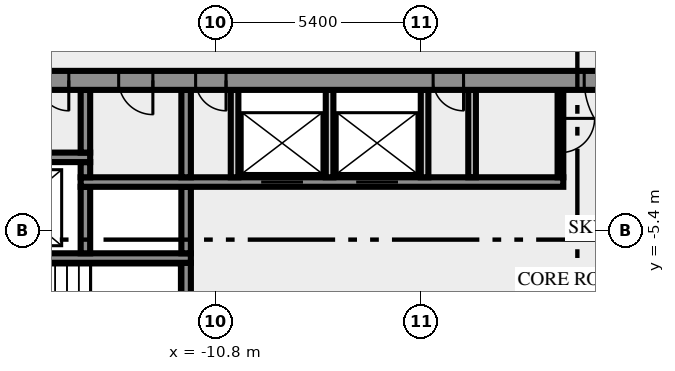
"""IFC4 building model, lengths in metres.
Left out: names, types, materials, properties, quantities, classifications, styles, units other than length and angle.
Written with IfcOpenShell. Run it as: python <this file> out.ifc"""

import sys

from ifc_helpers import new_model, si_unit, direction, frame, frame_2d, origin, place, context, subcontext, project, spatial, rectangle, extrude, element, fill, save


model = new_model("IFC4")
c1 = context("Model", 3, precision=1e-05, world=origin(), true_north=direction((0.0, 1.0)))
c2 = subcontext(c1, "Body", "Model", "MODEL_VIEW")
j1 = project(units=[si_unit("LENGTHUNIT", "METRE"), si_unit("PLANEANGLEUNIT", "RADIAN")], contexts=[c1])
p1 = place(None, origin())
s1 = spatial("IfcSite", under=j1, at=p1, CompositionType="ELEMENT")
p2 = place(p1, origin())
s2 = spatial("IfcBuilding", under=s1, at=p2, CompositionType="ELEMENT")
p3 = place(p2, frame((0.0, 0.0, 248.0)))
s3 = spatial("IfcBuildingStorey", under=s2, at=p3, CompositionType="ELEMENT", Elevation=248.0)
p4 = place(p3, frame((-11.575, -7.25, 0.0), z_axis=(0.0, 0.0, 1.0), x_axis=(0.0, 1.0, 0.0)))
e1 = element("IfcWall", 1, at=p4, inside=s3, PredefinedType="SHEAR", context=c2, shape_type="SweptSolid", body=[
    extrude(rectangle(XDim=1.0, YDim=0.25, at=frame_2d((0.5, 0.0))), origin(), (0.0, 0.0, 1.0), 4.65),
])
p5 = place(p3, frame((-11.45, -6.125, 0.0), z_axis=(0.0, 0.0, 1.0), x_axis=(-1.0, 0.0, 0.0)))
e2 = element("IfcWall", 2, at=p5, inside=s3, PredefinedType="SHEAR", context=c2, shape_type="SweptSolid", body=[
    extrude(rectangle(XDim=8.05, YDim=0.25, at=frame_2d((4.025, 0.0))), origin(), (0.0, 0.0, 1.0), 4.65),
])
p6 = place(p5, frame((6.2, 0.0, 0.0)))
e3 = element("IfcOpeningElement", 3, at=p6, cuts=e2, PredefinedType="OPENING", context=c2, shape_type="SweptSolid", body=[
    extrude(rectangle(XDim=1.8, YDim=2.1, at=frame_2d((0.9, 1.05))), frame((0.0, 0.135, 0.0), z_axis=(0.0, -1.0, 0.0), x_axis=(1.0, 0.0, 0.0)), (0.0, 0.0, 1.0), 0.27),
])
for number, where, z_axis, x_axis in (
    (4, (-14.225, -6.0, 0.0), (0.0, 0.0, 1.0), (0.0, 1.0, 0.0)),
    (5, (-11.575, -6.0, 0.0), (0.0, 0.0, 1.0), (0.0, 1.0, 0.0)),
):
    element("IfcWall", number, at=place(p3, frame(where, z_axis=z_axis, x_axis=x_axis)), inside=s3, PredefinedType="SHEAR", context=c2, shape_type="SweptSolid", body=[
        extrude(rectangle(XDim=1.75, YDim=0.25, at=frame_2d((0.875, 0.0))), origin(), (0.0, 0.0, 1.0), 4.65),
    ])
p7 = place(p3, frame((-14.35, -4.125, 0.0), z_axis=(0.0, 0.0, 1.0), x_axis=(1.0, 0.0, 0.0)))
e6 = element("IfcWall", 6, at=p7, inside=s3, PredefinedType="SHEAR", context=c2, shape_type="SweptSolid", body=[
    extrude(rectangle(XDim=12.7, YDim=0.25, at=frame_2d((6.35, 0.0))), origin(), (0.0, 0.0, 1.0), 4.65),
])
p8 = place(p7, frame((4.75, 0.0, 0.0)))
e7 = element("IfcOpeningElement", 7, at=p8, cuts=e6, PredefinedType="OPENING", context=c2, shape_type="SweptSolid", body=[
    extrude(rectangle(XDim=1.1, YDim=2.1, at=frame_2d((0.55, 1.05))), frame((0.0, 0.135, 0.0), z_axis=(0.0, -1.0, 0.0), x_axis=(1.0, 0.0, 0.0)), (0.0, 0.0, 1.0), 0.27),
])
p9 = place(p7, frame((7.25, 0.0, 0.0)))
e8 = element("IfcOpeningElement", 8, at=p9, cuts=e6, PredefinedType="OPENING", context=c2, shape_type="SweptSolid", body=[
    extrude(rectangle(XDim=1.1, YDim=2.1, at=frame_2d((0.55, 1.05))), frame((0.0, 0.135, 0.0), z_axis=(0.0, -1.0, 0.0), x_axis=(1.0, 0.0, 0.0)), (0.0, 0.0, 1.0), 0.27),
])
p10 = place(p3, frame((-14.225, -4.0, 0.0), z_axis=(0.0, 0.0, 1.0), x_axis=(0.0, 1.0, 0.0)))
e9 = element("IfcWall", 9, at=p10, inside=s3, PredefinedType="SHEAR", context=c2, shape_type="SweptSolid", body=[
    extrude(rectangle(XDim=0.4, YDim=0.25, at=frame_2d((0.2, 0.0))), origin(), (0.0, 0.0, 1.0), 4.65),
])
p11 = place(p3, frame((-11.575, -4.0, 0.0), z_axis=(0.0, 0.0, 1.0), x_axis=(0.0, 1.0, 0.0)))
e10 = element("IfcWall", 10, at=p11, inside=s3, PredefinedType="SHEAR", context=c2, shape_type="SweptSolid", body=[
    extrude(rectangle(XDim=2.3, YDim=0.25, at=frame_2d((1.15, 0.0))), origin(), (0.0, 0.0, 1.0), 4.65),
])
for number, where, z_axis, x_axis in (
    (11, (-10.3, -4.0, 0.0), (0.0, 0.0, 1.0), (0.0, 1.0, 0.0)),
    (12, (-7.8, -4.0, 0.0), (0.0, 0.0, 1.0), (0.0, 1.0, 0.0)),
    (13, (-5.3, -4.0, 0.0), (0.0, 0.0, 1.0), (0.0, 1.0, 0.0)),
    (14, (-4.05, -4.0, 0.0), (0.0, 0.0, 1.0), (0.0, 1.0, 0.0)),
):
    element("IfcWall", number, at=place(p3, frame(where, z_axis=z_axis, x_axis=x_axis)), inside=s3, PredefinedType="SOLIDWALL", context=c2, shape_type="SweptSolid", body=[
        extrude(rectangle(XDim=2.3, YDim=0.2, at=frame_2d((1.15, 0.0))), origin(), (0.0, 0.0, 1.0), 4.65),
    ])
p12 = place(p3, frame((-1.725, -1.7, 0.0), z_axis=(0.0, 0.0, 1.0), x_axis=(0.0, -1.0, 0.0)))
e15 = element("IfcWall", 15, at=p12, inside=s3, PredefinedType="PARTITIONING", context=c2, shape_type="SweptSolid", body=[
    extrude(rectangle(XDim=2.3, YDim=0.15, at=frame_2d((1.15, 0.0))), origin(), (0.0, 0.0, 1.0), 4.65),
])
p13 = place(p12, frame((0.75, 0.0, 0.0)))
e16 = element("IfcOpeningElement", 16, at=p13, cuts=e15, PredefinedType="OPENING", context=c2, shape_type="SweptSolid", body=[
    extrude(rectangle(XDim=0.9, YDim=2.1, at=frame_2d((0.45, 1.05))), frame((0.0, 0.085, 0.0), z_axis=(0.0, -1.0, 0.0), x_axis=(1.0, 0.0, 0.0)), (0.0, 0.0, 1.0), 0.17),
])
p14 = place(p3, frame((-17.35, -3.475, 0.0), z_axis=(0.0, 0.0, 1.0), x_axis=(1.0, 0.0, 0.0)))
e17 = element("IfcWall", 17, at=p14, inside=s3, PredefinedType="SHEAR", context=c2, shape_type="SweptSolid", body=[
    extrude(rectangle(XDim=3.25, YDim=0.25, at=frame_2d((1.625, 0.0))), origin(), (0.0, 0.0, 1.0), 4.65),
])
p15 = place(p3, frame((-14.225, -3.35, 0.0), z_axis=(0.0, 0.0, 1.0), x_axis=(0.0, 1.0, 0.0)))
e18 = element("IfcWall", 18, at=p15, inside=s3, PredefinedType="SHEAR", context=c2, shape_type="SweptSolid", body=[
    extrude(rectangle(XDim=1.65, YDim=0.25, at=frame_2d((0.825, 0.0))), origin(), (0.0, 0.0, 1.0), 4.65),
])
p16 = place(p3, frame((20.49, -1.45, 0.0), z_axis=(0.0, 0.0, 1.0), x_axis=(-1.0, 0.0, 0.0)))
e19 = element("IfcWall", 19, at=p16, inside=s3, PredefinedType="SHEAR", context=c2, shape_type="SweptSolid", body=[
    extrude(rectangle(XDim=40.98, YDim=0.5, at=frame_2d((20.49, 0.0))), origin(), (0.0, 0.0, 1.0), 4.65),
])
p17 = place(p16, frame((38.14, 0.0, 0.0)))
e20 = element("IfcOpeningElement", 20, at=p17, cuts=e19, PredefinedType="OPENING", context=c2, shape_type="SweptSolid", body=[
    extrude(rectangle(XDim=1.8, YDim=2.1, at=frame_2d((0.9, 1.05))), frame((0.0, 0.26, 0.0), z_axis=(0.0, -1.0, 0.0), x_axis=(1.0, 0.0, 0.0)), (0.0, 0.0, 1.0), 0.52),
])
p18 = place(p16, frame((36.728, 0.0, 0.0)))
e21 = element("IfcOpeningElement", 21, at=p18, cuts=e19, PredefinedType="OPENING", context=c2, shape_type="SweptSolid", body=[
    extrude(rectangle(XDim=0.8, YDim=2.1, at=frame_2d((0.4, 1.05))), frame((0.0, 0.26, 0.0), z_axis=(0.0, -1.0, 0.0), x_axis=(1.0, 0.0, 0.0)), (0.0, 0.0, 1.0), 0.52),
])
p19 = place(p16, frame((35.153, 0.0, 0.0)))
e22 = element("IfcOpeningElement", 22, at=p19, cuts=e19, PredefinedType="OPENING", context=c2, shape_type="SweptSolid", body=[
    extrude(rectangle(XDim=0.8, YDim=2.1, at=frame_2d((0.4, 1.05))), frame((0.0, 0.26, 0.0), z_axis=(0.0, -1.0, 0.0), x_axis=(1.0, 0.0, 0.0)), (0.0, 0.0, 1.0), 0.52),
])
p20 = place(p16, frame((32.94, 0.0, 0.0)))
e23 = element("IfcOpeningElement", 23, at=p20, cuts=e19, PredefinedType="OPENING", context=c2, shape_type="SweptSolid", body=[
    extrude(rectangle(XDim=0.9, YDim=2.1, at=frame_2d((0.45, 1.05))), frame((0.0, 0.26, 0.0), z_axis=(0.0, -1.0, 0.0), x_axis=(1.0, 0.0, 0.0)), (0.0, 0.0, 1.0), 0.52),
])
p21 = place(p16, frame((31.015, 0.0, 0.0)))
e24 = element("IfcOpeningElement", 24, at=p21, cuts=e19, PredefinedType="OPENING", context=c2, shape_type="SweptSolid", body=[
    extrude(rectangle(XDim=0.8, YDim=2.1, at=frame_2d((0.4, 1.05))), frame((0.0, 0.26, 0.0), z_axis=(0.0, -1.0, 0.0), x_axis=(1.0, 0.0, 0.0)), (0.0, 0.0, 1.0), 0.52),
])
p22 = place(p16, frame((24.765, 0.0, 0.0)))
e25 = element("IfcOpeningElement", 25, at=p22, cuts=e19, PredefinedType="OPENING", context=c2, shape_type="SweptSolid", body=[
    extrude(rectangle(XDim=0.8, YDim=2.1, at=frame_2d((0.4, 1.05))), frame((0.0, 0.26, 0.0), z_axis=(0.0, -1.0, 0.0), x_axis=(1.0, 0.0, 0.0)), (0.0, 0.0, 1.0), 0.52),
])
p23 = place(p16, frame((19.59, 0.0, 0.0)))
e26 = element("IfcOpeningElement", 26, at=p23, cuts=e19, PredefinedType="OPENING", context=c2, shape_type="SweptSolid", body=[
    extrude(rectangle(XDim=2.0, YDim=2.1, at=frame_2d((1.0, 1.05))), frame((0.0, 0.26, 0.0), z_axis=(0.0, -1.0, 0.0), x_axis=(1.0, 0.0, 0.0)), (0.0, 0.0, 1.0), 0.52),
])
p24 = place(p16, frame((7.14, 0.0, 0.0)))
e27 = element("IfcOpeningElement", 27, at=p24, cuts=e19, PredefinedType="OPENING", context=c2, shape_type="SweptSolid", body=[
    extrude(rectangle(XDim=0.9, YDim=2.1, at=frame_2d((0.45, 1.05))), frame((0.0, 0.26, 0.0), z_axis=(0.0, -1.0, 0.0), x_axis=(1.0, 0.0, 0.0)), (0.0, 0.0, 1.0), 0.52),
])
p25 = place(p16, frame((4.19, 0.0, 0.0)))
e28 = element("IfcOpeningElement", 28, at=p25, cuts=e19, PredefinedType="OPENING", context=c2, shape_type="SweptSolid", body=[
    extrude(rectangle(XDim=0.9, YDim=2.1, at=frame_2d((0.45, 1.05))), frame((0.0, 0.26, 0.0), z_axis=(0.0, -1.0, 0.0), x_axis=(1.0, 0.0, 0.0)), (0.0, 0.0, 1.0), 0.52),
])
p26 = place(p16, frame((1.04, 0.0, 0.0)))
e29 = element("IfcOpeningElement", 29, at=p26, cuts=e19, PredefinedType="OPENING", context=c2, shape_type="SweptSolid", body=[
    extrude(rectangle(XDim=1.8, YDim=2.1, at=frame_2d((0.9, 1.05))), frame((0.0, 0.26, 0.0), z_axis=(0.0, -1.0, 0.0), x_axis=(1.0, 0.0, 0.0)), (0.0, 0.0, 1.0), 0.52),
])
p27 = place(p8, origin())
e30 = element("IfcDoor", 30, at=p27, inside=s3, OperationType="DOUBLE_DOOR_SLIDING", PredefinedType="DOOR", context=c2, shape_type="SweptSolid", body=[
    extrude(rectangle(XDim=1.1, YDim=2.1, at=frame_2d((0.55, 1.05))), frame((0.0, 0.025, 0.0), z_axis=(0.0, -1.0, 0.0), x_axis=(1.0, 0.0, 0.0)), (0.0, 0.0, 1.0), 0.05),
])
fill(e7, e30)
p28 = place(p9, origin())
e31 = element("IfcDoor", 31, at=p28, inside=s3, OperationType="DOUBLE_DOOR_SLIDING", PredefinedType="DOOR", context=c2, shape_type="SweptSolid", body=[
    extrude(rectangle(XDim=1.1, YDim=2.1, at=frame_2d((0.55, 1.05))), frame((0.0, 0.025, 0.0), z_axis=(0.0, -1.0, 0.0), x_axis=(1.0, 0.0, 0.0)), (0.0, 0.0, 1.0), 0.05),
])
fill(e8, e31)
p29 = place(p13, origin())
e32 = element("IfcDoor", 32, at=p29, inside=s3, OperationType="SINGLE_SWING_RIGHT", PredefinedType="DOOR", context=c2, shape_type="SweptSolid", body=[
    extrude(rectangle(XDim=0.9, YDim=2.1, at=frame_2d((0.45, 1.05))), frame((0.0, 0.025, 0.0), z_axis=(0.0, -1.0, 0.0), x_axis=(1.0, 0.0, 0.0)), (0.0, 0.0, 1.0), 0.05),
])
fill(e16, e32)
p30 = place(p19, origin())
e33 = element("IfcDoor", 33, at=p30, inside=s3, OperationType="SINGLE_SWING_RIGHT", PredefinedType="DOOR", context=c2, shape_type="SweptSolid", body=[
    extrude(rectangle(XDim=0.8, YDim=2.1, at=frame_2d((0.4, 1.05))), frame((0.0, 0.025, 0.0), z_axis=(0.0, -1.0, 0.0), x_axis=(1.0, 0.0, 0.0)), (0.0, 0.0, 1.0), 0.05),
])
fill(e22, e33)
p31 = place(p20, origin())
e34 = element("IfcDoor", 34, at=p31, inside=s3, OperationType="SINGLE_SWING_RIGHT", PredefinedType="DOOR", context=c2, shape_type="SweptSolid", body=[
    extrude(rectangle(XDim=0.9, YDim=2.1, at=frame_2d((0.45, 1.05))), frame((0.0, 0.025, 0.0), z_axis=(0.0, -1.0, 0.0), x_axis=(1.0, 0.0, 0.0)), (0.0, 0.0, 1.0), 0.05),
])
fill(e23, e34)
p32 = place(p21, origin())
e35 = element("IfcDoor", 35, at=p32, inside=s3, OperationType="SINGLE_SWING_RIGHT", PredefinedType="DOOR", context=c2, shape_type="SweptSolid", body=[
    extrude(rectangle(XDim=0.8, YDim=2.1, at=frame_2d((0.4, 1.05))), frame((0.0, 0.025, 0.0), z_axis=(0.0, -1.0, 0.0), x_axis=(1.0, 0.0, 0.0)), (0.0, 0.0, 1.0), 0.05),
])
fill(e24, e35)
p33 = place(p22, origin())
e36 = element("IfcDoor", 36, at=p33, inside=s3, OperationType="SINGLE_SWING_RIGHT", PredefinedType="DOOR", context=c2, shape_type="SweptSolid", body=[
    extrude(rectangle(XDim=0.8, YDim=2.1, at=frame_2d((0.4, 1.05))), frame((0.0, 0.025, 0.0), z_axis=(0.0, -1.0, 0.0), x_axis=(1.0, 0.0, 0.0)), (0.0, 0.0, 1.0), 0.05),
])
fill(e25, e36)
p34 = place(p23, origin())
e37 = element("IfcDoor", 37, at=p34, inside=s3, OperationType="DOUBLE_DOOR_SINGLE_SWING", PredefinedType="DOOR", context=c2, shape_type="SweptSolid", body=[
    extrude(rectangle(XDim=2.0, YDim=2.1, at=frame_2d((1.0, 1.05))), frame((0.0, 0.025, 0.0), z_axis=(0.0, -1.0, 0.0), x_axis=(1.0, 0.0, 0.0)), (0.0, 0.0, 1.0), 0.05),
])
fill(e26, e37)
save(model, sys.argv[1])
